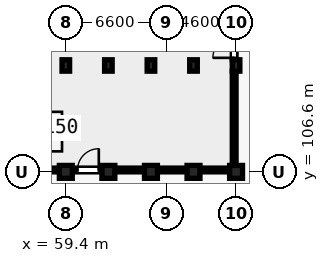
"""IFC4 building model, lengths in metres.
Left out: names, types, materials, properties, quantities, classifications, styles, units other than length and angle.
Written with IfcOpenShell. Run it as: python <this file> out.ifc"""

import sys

from ifc_helpers import new_model, si_unit, direction, frame, frame_2d, origin, origin_2d, place, context, subcontext, project, spatial, rectangle, extrude, element, fill, save


model = new_model("IFC4")
c1 = context("Model", 3, precision=1e-05, world=origin(), true_north=direction((0.0, 1.0)))
c2 = subcontext(c1, "Body", "Model", "MODEL_VIEW")
j1 = project(units=[si_unit("LENGTHUNIT", "METRE"), si_unit("PLANEANGLEUNIT", "RADIAN")], contexts=[c1])
p1 = place(None, origin())
s1 = spatial("IfcSite", under=j1, at=p1, CompositionType="ELEMENT")
p2 = place(p1, origin())
s2 = spatial("IfcBuilding", under=s1, at=p2, CompositionType="ELEMENT")
p3 = place(p2, origin())
s3 = spatial("IfcBuildingStorey", under=s2, at=p3, CompositionType="ELEMENT", Elevation=0.0)
p4 = place(p3, frame((59.4, 106.6, 0.0), z_axis=(0.0, 0.0, 1.0), x_axis=(1.0, 0.0, 0.0)))
e1 = element("IfcColumn", 1, at=p4, inside=s3, PredefinedType="COLUMN", context=c2, shape_type="SweptSolid", body=[
    extrude(rectangle(XDim=0.85, YDim=0.85, at=origin_2d()), origin(), (0.0, 0.0, 1.0), 4.15),
])
p5 = place(p3, frame((59.4, 113.6, 0.0), z_axis=(0.0, 0.0, 1.0), x_axis=(1.0, 0.0, 0.0)))
e2 = element("IfcColumn", 2, at=p5, inside=s3, PredefinedType="COLUMN", context=c2, shape_type="SweptSolid", body=[
    extrude(rectangle(XDim=0.5, YDim=0.75, at=origin_2d()), origin(), (0.0, 0.0, 1.0), 4.15),
])
p6 = place(p3, frame((62.2, 106.6, 0.0), z_axis=(0.0, 0.0, 1.0), x_axis=(1.0, 0.0, 0.0)))
e3 = element("IfcColumn", 3, at=p6, inside=s3, PredefinedType="COLUMN", context=c2, shape_type="SweptSolid", body=[
    extrude(rectangle(XDim=0.85, YDim=0.85, at=origin_2d()), origin(), (0.0, 0.0, 1.0), 4.15),
])
p7 = place(p3, frame((62.2, 113.6, 0.0), z_axis=(0.0, 0.0, 1.0), x_axis=(1.0, 0.0, 0.0)))
e4 = element("IfcColumn", 4, at=p7, inside=s3, PredefinedType="COLUMN", context=c2, shape_type="SweptSolid", body=[
    extrude(rectangle(XDim=0.5, YDim=0.75, at=origin_2d()), origin(), (0.0, 0.0, 1.0), 4.15),
])
p8 = place(p3, frame((65.0, 106.6, 0.0), z_axis=(0.0, 0.0, 1.0), x_axis=(1.0, 0.0, 0.0)))
e5 = element("IfcColumn", 5, at=p8, inside=s3, PredefinedType="COLUMN", context=c2, shape_type="SweptSolid", body=[
    extrude(rectangle(XDim=0.85, YDim=0.85, at=origin_2d()), origin(), (0.0, 0.0, 1.0), 4.15),
])
p9 = place(p3, frame((65.0, 113.6, 0.0), z_axis=(0.0, 0.0, 1.0), x_axis=(1.0, 0.0, 0.0)))
e6 = element("IfcColumn", 6, at=p9, inside=s3, PredefinedType="COLUMN", context=c2, shape_type="SweptSolid", body=[
    extrude(rectangle(XDim=0.5, YDim=0.75, at=origin_2d()), origin(), (0.0, 0.0, 1.0), 4.15),
])
p10 = place(p3, frame((67.8, 106.6, 0.0), z_axis=(0.0, 0.0, 1.0), x_axis=(1.0, 0.0, 0.0)))
e7 = element("IfcColumn", 7, at=p10, inside=s3, PredefinedType="COLUMN", context=c2, shape_type="SweptSolid", body=[
    extrude(rectangle(XDim=0.85, YDim=0.85, at=origin_2d()), origin(), (0.0, 0.0, 1.0), 4.15),
])
p11 = place(p3, frame((67.8, 113.6, 0.0), z_axis=(0.0, 0.0, 1.0), x_axis=(1.0, 0.0, 0.0)))
e8 = element("IfcColumn", 8, at=p11, inside=s3, PredefinedType="COLUMN", context=c2, shape_type="SweptSolid", body=[
    extrude(rectangle(XDim=0.5, YDim=0.75, at=origin_2d()), origin(), (0.0, 0.0, 1.0), 4.15),
])
p12 = place(p3, frame((70.6, 106.6, 0.0), z_axis=(0.0, 0.0, 1.0), x_axis=(1.0, 0.0, 0.0)))
e9 = element("IfcColumn", 9, at=p12, inside=s3, PredefinedType="COLUMN", context=c2, shape_type="SweptSolid", body=[
    extrude(rectangle(XDim=0.85, YDim=0.85, at=origin_2d()), origin(), (0.0, 0.0, 1.0), 4.15),
])
p13 = place(p3, frame((70.6, 113.6, 0.0), z_axis=(0.0, 0.0, 1.0), x_axis=(1.0, 0.0, 0.0)))
e10 = element("IfcColumn", 10, at=p13, inside=s3, PredefinedType="COLUMN", context=c2, shape_type="SweptSolid", body=[
    extrude(rectangle(XDim=0.5, YDim=0.75, at=origin_2d()), origin(), (0.0, 0.0, 1.0), 4.15),
])
p14 = place(p3, frame((59.25, 107.95, 0.0), z_axis=(0.0, 0.0, 1.0), x_axis=(0.0, 1.0, 0.0)))
e11 = element("IfcWall", 11, at=p14, inside=s3, PredefinedType="STANDARD", context=c2, shape_type="SweptSolid", body=[
    extrude(rectangle(XDim=2.6, YDim=0.2, at=frame_2d((1.3, 0.0))), origin(), (0.0, 0.0, 1.0), 3.492),
])
p15 = place(p3, frame((57.35, 107.85, 0.0), z_axis=(0.0, 0.0, 1.0), x_axis=(1.0, 0.0, 0.0)))
e12 = element("IfcWall", 12, at=p15, inside=s3, PredefinedType="STANDARD", context=c2, shape_type="SweptSolid", body=[
    extrude(rectangle(XDim=1.8, YDim=0.2, at=frame_2d((0.9, 0.0))), origin(), (0.0, 0.0, 1.0), 4.15),
])
p16 = place(p3, frame((57.35, 110.65, 0.0), z_axis=(0.0, 0.0, 1.0), x_axis=(1.0, 0.0, 0.0)))
e13 = element("IfcWall", 13, at=p16, inside=s3, PredefinedType="STANDARD", context=c2, shape_type="SweptSolid", body=[
    extrude(rectangle(XDim=1.8, YDim=0.2, at=frame_2d((0.9, 0.0))), origin(), (0.0, 0.0, 1.0), 4.15),
])
p17 = place(p16, frame((0.39, 0.0, 0.0)))
e14 = element("IfcOpeningElement", 14, at=p17, cuts=e13, PredefinedType="OPENING", context=c2, shape_type="SweptSolid", body=[
    extrude(rectangle(XDim=1.02, YDim=2.15, at=frame_2d((0.51, 1.075))), frame((0.0, 0.11, 0.0), z_axis=(0.0, -1.0, 0.0), x_axis=(1.0, 0.0, 0.0)), (0.0, 0.0, 1.0), 0.22),
])
p18 = place(p3, frame((53.75, 113.6, 0.0), z_axis=(0.0, 0.0, 1.0), x_axis=(1.0, 0.0, 0.0)))
e15 = element("IfcWall", 15, at=p18, inside=s3, PredefinedType="STANDARD", context=c2, shape_type="SweptSolid", body=[
    extrude(rectangle(XDim=5.6, YDim=0.2, at=frame_2d((2.8, 0.0))), origin(), (0.0, 0.0, 1.0), 3.492),
])
p19 = place(p18, frame((1.91, 0.0, 0.0)))
e16 = element("IfcOpeningElement", 16, at=p19, cuts=e15, PredefinedType="OPENING", context=c2, shape_type="SweptSolid", body=[
    extrude(rectangle(XDim=1.22, YDim=2.15, at=frame_2d((0.61, 1.075))), frame((0.0, 0.11, 0.0), z_axis=(0.0, -1.0, 0.0), x_axis=(1.0, 0.0, 0.0)), (0.0, 0.0, 1.0), 0.22),
])
p20 = place(p3, frame((59.4, 113.6, 0.0), z_axis=(0.0, 0.0, 1.0), x_axis=(1.0, 0.0, 0.0)))
e17 = element("IfcWall", 17, at=p20, inside=s3, PredefinedType="STANDARD", context=c2, shape_type="SweptSolid", body=[
    extrude(rectangle(XDim=2.8, YDim=0.2, at=frame_2d((1.4, 0.0))), origin(), (0.0, 0.0, 1.0), 3.492),
])
p21 = place(p20, frame((0.9, 0.0, 0.0)))
e18 = element("IfcOpeningElement", 18, at=p21, cuts=e17, PredefinedType="OPENING", context=c2, shape_type="SweptSolid", body=[
    extrude(rectangle(XDim=1.0, YDim=2.15, at=frame_2d((0.5, 1.075))), frame((0.0, 0.11, 0.0), z_axis=(0.0, -1.0, 0.0), x_axis=(1.0, 0.0, 0.0)), (0.0, 0.0, 1.0), 0.22),
])
p22 = place(p3, frame((62.2, 113.6, 0.0), z_axis=(0.0, 0.0, 1.0), x_axis=(1.0, 0.0, 0.0)))
e19 = element("IfcWall", 19, at=p22, inside=s3, PredefinedType="STANDARD", context=c2, shape_type="SweptSolid", body=[
    extrude(rectangle(XDim=2.8, YDim=0.2, at=frame_2d((1.4, 0.0))), origin(), (0.0, 0.0, 1.0), 3.492),
])
p23 = place(p3, frame((65.0, 113.6, 0.0), z_axis=(0.0, 0.0, 1.0), x_axis=(1.0, 0.0, 0.0)))
e20 = element("IfcWall", 20, at=p23, inside=s3, PredefinedType="STANDARD", context=c2, shape_type="SweptSolid", body=[
    extrude(rectangle(XDim=2.8, YDim=0.2, at=frame_2d((1.4, 0.0))), origin(), (0.0, 0.0, 1.0), 3.492),
])
p24 = place(p23, frame((0.9, 0.0, 0.0)))
e21 = element("IfcOpeningElement", 21, at=p24, cuts=e20, PredefinedType="OPENING", context=c2, shape_type="SweptSolid", body=[
    extrude(rectangle(XDim=1.0, YDim=2.15, at=frame_2d((0.5, 1.075))), frame((0.0, 0.11, 0.0), z_axis=(0.0, -1.0, 0.0), x_axis=(1.0, 0.0, 0.0)), (0.0, 0.0, 1.0), 0.22),
])
p25 = place(p3, frame((67.8, 113.6, 0.0), z_axis=(0.0, 0.0, 1.0), x_axis=(1.0, 0.0, 0.0)))
e22 = element("IfcWall", 22, at=p25, inside=s3, PredefinedType="STANDARD", context=c2, shape_type="SweptSolid", body=[
    extrude(rectangle(XDim=2.8, YDim=0.2, at=frame_2d((1.4, 0.0))), origin(), (0.0, 0.0, 1.0), 3.492),
])
p26 = place(p3, frame((62.2, 106.8, 0.0), z_axis=(0.0, 0.0, 1.0), x_axis=(0.0, 1.0, 0.0)))
e23 = element("IfcWall", 23, at=p26, inside=s3, PredefinedType="PARTITIONING", context=c2, shape_type="SweptSolid", body=[
    extrude(rectangle(XDim=6.75, YDim=0.15, at=frame_2d((3.375, 0.0))), origin(), (0.0, 0.0, 1.0), 3.492),
])
p27 = place(p26, frame((2.925, 0.0, 0.0)))
e24 = element("IfcOpeningElement", 24, at=p27, cuts=e23, PredefinedType="OPENING", context=c2, shape_type="SweptSolid", body=[
    extrude(rectangle(XDim=0.9, YDim=2.1, at=frame_2d((0.45, 1.05))), frame((0.0, 0.085, 0.0), z_axis=(0.0, -1.0, 0.0), x_axis=(1.0, 0.0, 0.0)), (0.0, 0.0, 1.0), 0.17),
])
p28 = place(p3, frame((65.0, 106.8, 0.0), z_axis=(0.0, 0.0, 1.0), x_axis=(0.0, 1.0, 0.0)))
e25 = element("IfcWall", 25, at=p28, inside=s3, PredefinedType="STANDARD", context=c2, shape_type="SweptSolid", body=[
    extrude(rectangle(XDim=6.75, YDim=0.22, at=frame_2d((3.375, 0.0))), origin(), (0.0, 0.0, 1.0), 3.492),
])
p29 = place(p3, frame((67.8, 106.8, 0.0), z_axis=(0.0, 0.0, 1.0), x_axis=(0.0, 1.0, 0.0)))
e26 = element("IfcWall", 26, at=p29, inside=s3, PredefinedType="PARTITIONING", context=c2, shape_type="SweptSolid", body=[
    extrude(rectangle(XDim=6.75, YDim=0.15, at=frame_2d((3.375, 0.0))), origin(), (0.0, 0.0, 1.0), 3.492),
])
p30 = place(p29, frame((2.925, 0.0, 0.0)))
e27 = element("IfcOpeningElement", 27, at=p30, cuts=e26, PredefinedType="OPENING", context=c2, shape_type="SweptSolid", body=[
    extrude(rectangle(XDim=0.9, YDim=2.1, at=frame_2d((0.45, 1.05))), frame((0.0, 0.085, 0.0), z_axis=(0.0, -1.0, 0.0), x_axis=(1.0, 0.0, 0.0)), (0.0, 0.0, 1.0), 0.17),
])
p31 = place(p3, frame((56.628, 106.725, 0.0), z_axis=(0.0, 0.0, 1.0), x_axis=(1.0, 0.0, 0.0)))
e28 = element("IfcWall", 28, at=p31, inside=s3, PredefinedType="STANDARD", context=c2, shape_type="SweptSolid", body=[
    extrude(rectangle(XDim=2.422, YDim=0.25, at=frame_2d((1.211, 0.0))), origin(), (0.0, 0.0, 1.0), 3.692),
])
p32 = place(p31, frame((0.822, 0.0, 0.88)))
e29 = element("IfcOpeningElement", 29, at=p32, cuts=e28, PredefinedType="OPENING", context=c2, shape_type="SweptSolid", body=[
    extrude(rectangle(XDim=1.2, YDim=1.5, at=frame_2d((0.6, 0.75))), frame((0.0, 0.135, 0.0), z_axis=(0.0, -1.0, 0.0), x_axis=(1.0, 0.0, 0.0)), (0.0, 0.0, 1.0), 0.27),
])
p33 = place(p3, frame((59.82, 106.725, 0.0), z_axis=(0.0, 0.0, 1.0), x_axis=(1.0, 0.0, 0.0)))
e30 = element("IfcWall", 30, at=p33, inside=s3, PredefinedType="STANDARD", context=c2, shape_type="SweptSolid", body=[
    extrude(rectangle(XDim=1.96, YDim=0.25, at=frame_2d((0.98, 0.0))), origin(), (0.0, 0.0, 1.0), 3.692),
])
p34 = place(p33, frame((0.35, 0.0, 0.0)))
e31 = element("IfcOpeningElement", 31, at=p34, cuts=e30, PredefinedType="OPENING", context=c2, shape_type="SweptSolid", body=[
    extrude(rectangle(XDim=1.4, YDim=2.15, at=frame_2d((0.7, 1.075))), frame((0.0, 0.135, 0.0), z_axis=(0.0, -1.0, 0.0), x_axis=(1.0, 0.0, 0.0)), (0.0, 0.0, 1.0), 0.27),
])
p35 = place(p3, frame((62.62, 106.725, 0.0), z_axis=(0.0, 0.0, 1.0), x_axis=(1.0, 0.0, 0.0)))
e32 = element("IfcWall", 32, at=p35, inside=s3, PredefinedType="STANDARD", context=c2, shape_type="SweptSolid", body=[
    extrude(rectangle(XDim=1.96, YDim=0.25, at=frame_2d((0.98, 0.0))), origin(), (0.0, 0.0, 1.0), 3.692),
])
p36 = place(p35, frame((0.38, 0.0, 0.88)))
e33 = element("IfcOpeningElement", 33, at=p36, cuts=e32, PredefinedType="OPENING", context=c2, shape_type="SweptSolid", body=[
    extrude(rectangle(XDim=1.2, YDim=1.5, at=frame_2d((0.6, 0.75))), frame((0.0, 0.135, 0.0), z_axis=(0.0, -1.0, 0.0), x_axis=(1.0, 0.0, 0.0)), (0.0, 0.0, 1.0), 0.27),
])
p37 = place(p3, frame((65.42, 106.725, 0.0), z_axis=(0.0, 0.0, 1.0), x_axis=(1.0, 0.0, 0.0)))
e34 = element("IfcWall", 34, at=p37, inside=s3, PredefinedType="STANDARD", context=c2, shape_type="SweptSolid", body=[
    extrude(rectangle(XDim=1.96, YDim=0.25, at=frame_2d((0.98, 0.0))), origin(), (0.0, 0.0, 1.0), 3.692),
])
p38 = place(p37, frame((0.38, 0.0, 0.88)))
e35 = element("IfcOpeningElement", 35, at=p38, cuts=e34, PredefinedType="OPENING", context=c2, shape_type="SweptSolid", body=[
    extrude(rectangle(XDim=1.2, YDim=1.5, at=frame_2d((0.6, 0.75))), frame((0.0, 0.135, 0.0), z_axis=(0.0, -1.0, 0.0), x_axis=(1.0, 0.0, 0.0)), (0.0, 0.0, 1.0), 0.27),
])
p39 = place(p3, frame((68.22, 106.725, 0.0), z_axis=(0.0, 0.0, 1.0), x_axis=(1.0, 0.0, 0.0)))
e36 = element("IfcWall", 36, at=p39, inside=s3, PredefinedType="STANDARD", context=c2, shape_type="SweptSolid", body=[
    extrude(rectangle(XDim=1.96, YDim=0.25, at=frame_2d((0.98, 0.0))), origin(), (0.0, 0.0, 1.0), 3.692),
])
p40 = place(p39, frame((0.38, 0.0, 0.88)))
e37 = element("IfcOpeningElement", 37, at=p40, cuts=e36, PredefinedType="OPENING", context=c2, shape_type="SweptSolid", body=[
    extrude(rectangle(XDim=1.2, YDim=1.5, at=frame_2d((0.6, 0.75))), frame((0.0, 0.135, 0.0), z_axis=(0.0, -1.0, 0.0), x_axis=(1.0, 0.0, 0.0)), (0.0, 0.0, 1.0), 0.27),
])
p41 = place(p3, frame((70.475, 107.02, 0.0), z_axis=(0.0, 0.0, 1.0), x_axis=(0.0, 1.0, 0.0)))
e38 = element("IfcWall", 38, at=p41, inside=s3, PredefinedType="STANDARD", context=c2, shape_type="SweptSolid", body=[
    extrude(rectangle(XDim=6.201, YDim=0.25, at=frame_2d((3.101, 0.0))), origin(), (0.0, 0.0, 1.0), 3.492),
])
p42 = place(p41, frame((2.33, 0.0, 0.88)))
e39 = element("IfcOpeningElement", 39, at=p42, cuts=e38, PredefinedType="OPENING", context=c2, shape_type="SweptSolid", body=[
    extrude(rectangle(XDim=1.5, YDim=1.65, at=frame_2d((0.75, 0.825))), frame((0.0, 0.135, 0.0), z_axis=(0.0, -1.0, 0.0), x_axis=(1.0, 0.0, 0.0)), (0.0, 0.0, 1.0), 0.27),
])
p43 = place(p3, frame((70.475, 113.979, 0.0), z_axis=(0.0, 0.0, 1.0), x_axis=(0.0, 1.0, 0.0)))
e40 = element("IfcWall", 40, at=p43, inside=s3, PredefinedType="STANDARD", context=c2, shape_type="SweptSolid", body=[
    extrude(rectangle(XDim=1.643, YDim=0.25, at=frame_2d((0.822, 0.0))), origin(), (0.0, 0.0, 1.0), 3.492),
])
p44 = place(p43, frame((0.123, 0.0, 0.0)))
e41 = element("IfcOpeningElement", 41, at=p44, cuts=e40, PredefinedType="OPENING", context=c2, shape_type="SweptSolid", body=[
    extrude(rectangle(XDim=1.4, YDim=2.15, at=frame_2d((0.7, 1.075))), frame((0.0, 0.135, 0.0), z_axis=(0.0, -1.0, 0.0), x_axis=(1.0, 0.0, 0.0)), (0.0, 0.0, 1.0), 0.27),
])
p45 = place(p32, origin())
e42 = element("IfcWindow", 42, at=p45, inside=s3, PartitioningType="SINGLE_PANEL", PredefinedType="WINDOW", context=c2, shape_type="SweptSolid", body=[
    extrude(rectangle(XDim=1.2, YDim=1.5, at=frame_2d((0.6, 0.75))), frame((0.0, 0.03, 0.0), z_axis=(0.0, -1.0, 0.0), x_axis=(1.0, 0.0, 0.0)), (0.0, 0.0, 1.0), 0.06),
])
fill(e29, e42)
p46 = place(p36, origin())
e43 = element("IfcWindow", 43, at=p46, inside=s3, PartitioningType="SINGLE_PANEL", PredefinedType="WINDOW", context=c2, shape_type="SweptSolid", body=[
    extrude(rectangle(XDim=1.2, YDim=1.5, at=frame_2d((0.6, 0.75))), frame((0.0, 0.03, 0.0), z_axis=(0.0, -1.0, 0.0), x_axis=(1.0, 0.0, 0.0)), (0.0, 0.0, 1.0), 0.06),
])
fill(e33, e43)
p47 = place(p38, origin())
e44 = element("IfcWindow", 44, at=p47, inside=s3, PartitioningType="SINGLE_PANEL", PredefinedType="WINDOW", context=c2, shape_type="SweptSolid", body=[
    extrude(rectangle(XDim=1.2, YDim=1.5, at=frame_2d((0.6, 0.75))), frame((0.0, 0.03, 0.0), z_axis=(0.0, -1.0, 0.0), x_axis=(1.0, 0.0, 0.0)), (0.0, 0.0, 1.0), 0.06),
])
fill(e35, e44)
p48 = place(p40, origin())
e45 = element("IfcWindow", 45, at=p48, inside=s3, PartitioningType="SINGLE_PANEL", PredefinedType="WINDOW", context=c2, shape_type="SweptSolid", body=[
    extrude(rectangle(XDim=1.2, YDim=1.5, at=frame_2d((0.6, 0.75))), frame((0.0, 0.03, 0.0), z_axis=(0.0, -1.0, 0.0), x_axis=(1.0, 0.0, 0.0)), (0.0, 0.0, 1.0), 0.06),
])
fill(e37, e45)
p49 = place(p42, origin())
e46 = element("IfcWindow", 46, at=p49, inside=s3, PartitioningType="DOUBLE_PANEL_VERTICAL", PredefinedType="WINDOW", context=c2, shape_type="SweptSolid", body=[
    extrude(rectangle(XDim=1.5, YDim=1.65, at=frame_2d((0.75, 0.825))), frame((0.0, 0.03, 0.0), z_axis=(0.0, -1.0, 0.0), x_axis=(1.0, 0.0, 0.0)), (0.0, 0.0, 1.0), 0.06),
])
fill(e39, e46)
p50 = place(p17, origin())
e47 = element("IfcDoor", 47, at=p50, inside=s3, OperationType="SLIDING_TO_RIGHT", PredefinedType="DOOR", context=c2, shape_type="SweptSolid", body=[
    extrude(rectangle(XDim=1.02, YDim=2.15, at=frame_2d((0.51, 1.075))), frame((0.0, 0.025, 0.0), z_axis=(0.0, -1.0, 0.0), x_axis=(1.0, 0.0, 0.0)), (0.0, 0.0, 1.0), 0.05),
])
fill(e14, e47)
p51 = place(p21, origin())
e48 = element("IfcDoor", 48, at=p51, inside=s3, OperationType="SINGLE_SWING_LEFT", PredefinedType="DOOR", context=c2, shape_type="SweptSolid", body=[
    extrude(rectangle(XDim=1.0, YDim=2.15, at=frame_2d((0.5, 1.075))), frame((0.0, 0.025, 0.0), z_axis=(0.0, -1.0, 0.0), x_axis=(1.0, 0.0, 0.0)), (0.0, 0.0, 1.0), 0.05),
])
fill(e18, e48)
p52 = place(p24, origin())
e49 = element("IfcDoor", 49, at=p52, inside=s3, OperationType="SINGLE_SWING_LEFT", PredefinedType="DOOR", context=c2, shape_type="SweptSolid", body=[
    extrude(rectangle(XDim=1.0, YDim=2.15, at=frame_2d((0.5, 1.075))), frame((0.0, 0.025, 0.0), z_axis=(0.0, -1.0, 0.0), x_axis=(1.0, 0.0, 0.0)), (0.0, 0.0, 1.0), 0.05),
])
fill(e21, e49)
p53 = place(p27, frame((0.9, 0.0, 0.0), z_axis=(0.0, 0.0, 1.0), x_axis=(-1.0, 0.0, 0.0)))
e50 = element("IfcDoor", 50, at=p53, inside=s3, OperationType="SINGLE_SWING_RIGHT", PredefinedType="DOOR", context=c2, shape_type="SweptSolid", body=[
    extrude(rectangle(XDim=0.9, YDim=2.1, at=frame_2d((0.45, 1.05))), frame((0.0, 0.025, 0.0), z_axis=(0.0, -1.0, 0.0), x_axis=(1.0, 0.0, 0.0)), (0.0, 0.0, 1.0), 0.05),
])
fill(e24, e50)
p54 = place(p30, origin())
e51 = element("IfcDoor", 51, at=p54, inside=s3, OperationType="SINGLE_SWING_LEFT", PredefinedType="DOOR", context=c2, shape_type="SweptSolid", body=[
    extrude(rectangle(XDim=0.9, YDim=2.1, at=frame_2d((0.45, 1.05))), frame((0.0, 0.025, 0.0), z_axis=(0.0, -1.0, 0.0), x_axis=(1.0, 0.0, 0.0)), (0.0, 0.0, 1.0), 0.05),
])
fill(e27, e51)
p55 = place(p34, frame((1.4, 0.0, 0.0), z_axis=(0.0, 0.0, 1.0), x_axis=(-1.0, 0.0, 0.0)))
e52 = element("IfcDoor", 52, at=p55, inside=s3, OperationType="SINGLE_SWING_LEFT", PredefinedType="DOOR", context=c2, shape_type="SweptSolid", body=[
    extrude(rectangle(XDim=1.4, YDim=2.15, at=frame_2d((0.7, 1.075))), frame((0.0, 0.025, 0.0), z_axis=(0.0, -1.0, 0.0), x_axis=(1.0, 0.0, 0.0)), (0.0, 0.0, 1.0), 0.05),
])
fill(e31, e52)
p56 = place(p44, frame((1.4, 0.0, 0.0), z_axis=(0.0, 0.0, 1.0), x_axis=(-1.0, 0.0, 0.0)))
e53 = element("IfcDoor", 53, at=p56, inside=s3, OperationType="SINGLE_SWING_RIGHT", PredefinedType="DOOR", context=c2, shape_type="SweptSolid", body=[
    extrude(rectangle(XDim=1.4, YDim=2.15, at=frame_2d((0.7, 1.075))), frame((0.0, 0.025, 0.0), z_axis=(0.0, -1.0, 0.0), x_axis=(1.0, 0.0, 0.0)), (0.0, 0.0, 1.0), 0.05),
])
fill(e41, e53)
save(model, sys.argv[1])
